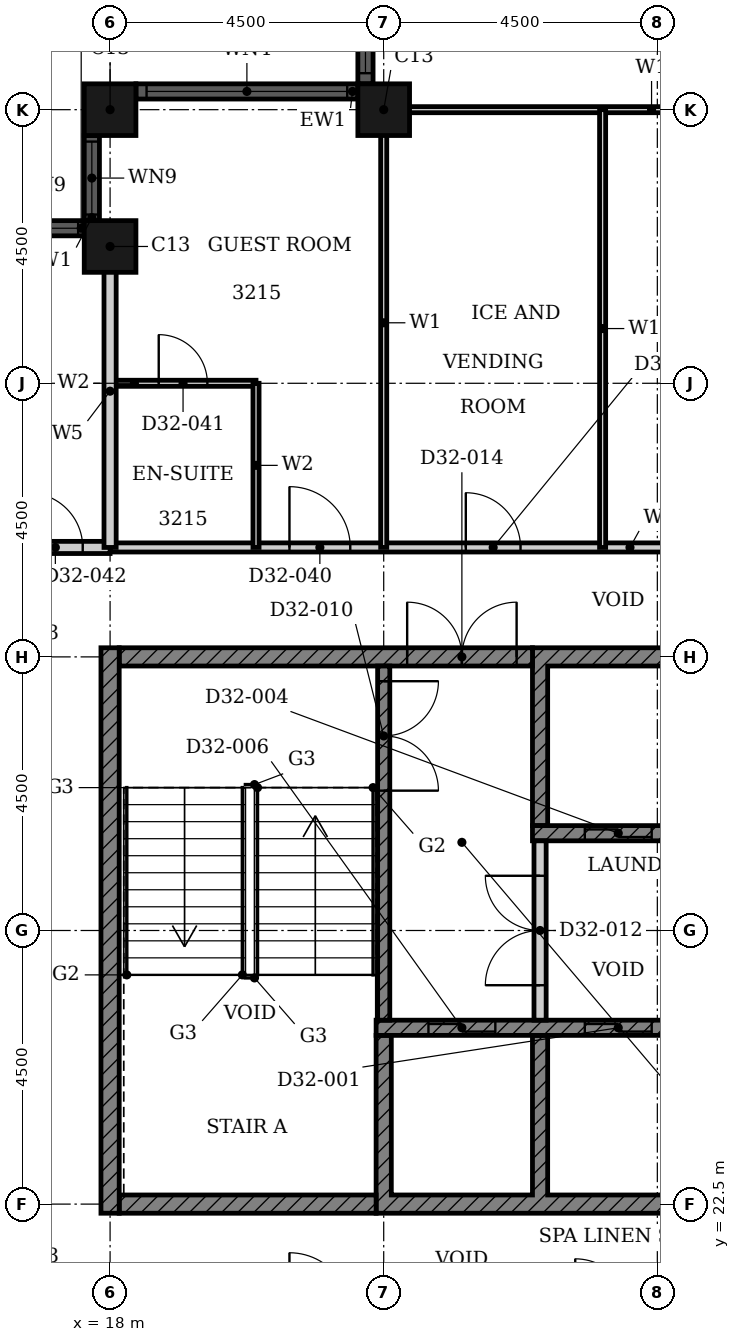
"""IFC4 building model, lengths in metres.
Left out: names, types, materials, properties, quantities, classifications, styles, units other than length and angle.
Written with IfcOpenShell. Run it as: python <this file> out.ifc"""

import sys

from ifc_helpers import new_model, si_unit, direction, frame, frame_2d, origin, origin_2d, place, context, subcontext, project, spatial, polyline, rectangle, hollow_rectangle, outline, extrude, element, fill, save


model = new_model("IFC4")
c1 = context("Model", 3, precision=1e-05, world=origin(), true_north=direction((0.0, 1.0)))
c2 = subcontext(c1, "Body", "Model", "MODEL_VIEW")
j1 = project(units=[si_unit("LENGTHUNIT", "METRE"), si_unit("PLANEANGLEUNIT", "RADIAN")], contexts=[c1])
p1 = place(None, origin())
s1 = spatial("IfcSite", under=j1, at=p1, CompositionType="ELEMENT")
p2 = place(p1, origin())
s2 = spatial("IfcBuilding", under=s1, at=p2, CompositionType="ELEMENT")
p3 = place(p2, frame((0.0, 0.0, 129.6)))
s3 = spatial("IfcBuildingStorey", under=s2, at=p3, CompositionType="ELEMENT", Elevation=129.6)
for number, where, z_axis, x_axis in (
    (1, (22.5, 40.5, 0.0), (0.0, 0.0, 1.0), (1.0, 0.0, 0.0)),
    (2, (18.0, 40.5, 0.0), (0.0, 0.0, 1.0), (1.0, 0.0, 0.0)),
    (3, (18.0, 38.25, 0.0), (0.0, 0.0, 1.0), (1.0, 0.0, 0.0)),
):
    element("IfcColumn", number, at=place(p3, frame(where, z_axis=z_axis, x_axis=x_axis)), inside=s3, PredefinedType="COLUMN", context=c2, shape_type="SweptSolid", body=[
        extrude(hollow_rectangle(XDim=0.85, YDim=0.85, WallThickness=0.026, at=origin_2d()), origin(), (0.0, 0.0, 1.0), 3.6),
    ])
p4 = place(p3, frame((22.2, 49.075, 0.0), z_axis=(0.0, 0.0, 1.0), x_axis=(0.0, -1.0, 0.0)))
e4 = element("IfcWall", 4, at=p4, inside=s3, PredefinedType="SOLIDWALL", context=c2, shape_type="SweptSolid", body=[
    extrude(rectangle(XDim=8.15, YDim=0.25, at=frame_2d((4.075, 0.0))), origin(), (0.0, 0.0, 1.0), 3.6),
])
p5 = place(p4, frame((0.175, 0.0, 0.9)))
e5 = element("IfcOpeningElement", 5, at=p5, cuts=e4, PredefinedType="OPENING", context=c2, shape_type="SweptSolid", body=[
    extrude(rectangle(XDim=3.3, YDim=2.08, at=frame_2d((1.65, 1.04))), frame((0.0, 0.135, 0.0), z_axis=(0.0, -1.0, 0.0), x_axis=(1.0, 0.0, 0.0)), (0.0, 0.0, 1.0), 0.27),
])
p6 = place(p4, frame((4.675, 0.0, 0.9)))
e6 = element("IfcOpeningElement", 6, at=p6, cuts=e4, PredefinedType="OPENING", context=c2, shape_type="SweptSolid", body=[
    extrude(rectangle(XDim=3.3, YDim=2.08, at=frame_2d((1.65, 1.04))), frame((0.0, 0.135, 0.0), z_axis=(0.0, -1.0, 0.0), x_axis=(1.0, 0.0, 0.0)), (0.0, 0.0, 1.0), 0.27),
])
p7 = place(p3, frame((22.075, 40.8, 0.0), z_axis=(0.0, 0.0, 1.0), x_axis=(-1.0, 0.0, 0.0)))
e7 = element("IfcWall", 7, at=p7, inside=s3, PredefinedType="SOLIDWALL", context=c2, shape_type="SweptSolid", body=[
    extrude(rectangle(XDim=3.65, YDim=0.25, at=frame_2d((1.825, 0.0))), origin(), (0.0, 0.0, 1.0), 3.6),
])
p8 = place(p7, frame((0.175, 0.0, 0.9)))
e8 = element("IfcOpeningElement", 8, at=p8, cuts=e7, PredefinedType="OPENING", context=c2, shape_type="SweptSolid", body=[
    extrude(rectangle(XDim=3.3, YDim=2.08, at=frame_2d((1.65, 1.04))), frame((0.0, 0.135, 0.0), z_axis=(0.0, -1.0, 0.0), x_axis=(1.0, 0.0, 0.0)), (0.0, 0.0, 1.0), 0.27),
])
p9 = place(p3, frame((17.7, 40.075, 0.0), z_axis=(0.0, 0.0, 1.0), x_axis=(0.0, -1.0, 0.0)))
e9 = element("IfcWall", 9, at=p9, inside=s3, PredefinedType="SOLIDWALL", context=c2, shape_type="SweptSolid", body=[
    extrude(rectangle(XDim=1.4, YDim=0.25, at=frame_2d((0.7, 0.0))), origin(), (0.0, 0.0, 1.0), 3.6),
])
p10 = place(p9, frame((0.1, 0.0, 0.9)))
e10 = element("IfcOpeningElement", 10, at=p10, cuts=e9, PredefinedType="OPENING", context=c2, shape_type="SweptSolid", body=[
    extrude(rectangle(XDim=1.2, YDim=2.08, at=frame_2d((0.6, 1.04))), frame((0.0, 0.135, 0.0), z_axis=(0.0, -1.0, 0.0), x_axis=(1.0, 0.0, 0.0)), (0.0, 0.0, 1.0), 0.27),
])
p11 = place(p3, frame((17.575, 38.55, 0.0), z_axis=(0.0, 0.0, 1.0), x_axis=(-1.0, 0.0, 0.0)))
e11 = element("IfcWall", 11, at=p11, inside=s3, PredefinedType="SOLIDWALL", context=c2, shape_type="SweptSolid", body=[
    extrude(rectangle(XDim=1.4, YDim=0.25, at=frame_2d((0.7, 0.0))), origin(), (0.0, 0.0, 1.0), 3.6),
])
p12 = place(p11, frame((0.1, 0.0, 0.9)))
e12 = element("IfcOpeningElement", 12, at=p12, cuts=e11, PredefinedType="OPENING", context=c2, shape_type="SweptSolid", body=[
    extrude(rectangle(XDim=1.2, YDim=2.08, at=frame_2d((0.6, 1.04))), frame((0.0, 0.135, 0.0), z_axis=(0.0, -1.0, 0.0), x_axis=(1.0, 0.0, 0.0)), (0.0, 0.0, 1.0), 0.27),
])
p13 = place(p3, origin())
e13 = element("IfcWall", 13, at=p13, inside=s3, PredefinedType="SHEAR", context=c2, shape_type="SweptSolid", body=[
    extrude(outline(polyline([(22.375, 22.35), (38.053, 22.35), (38.053, 25.275), (37.803, 25.275), (37.803, 22.65), (35.482, 22.65), (35.482, 25.275), (35.232, 25.275), (35.232, 22.65), (32.911, 22.65), (32.911, 25.275), (32.661, 25.275), (32.661, 22.65), (30.339, 22.65), (30.339, 25.275), (30.089, 25.275), (30.089, 22.65), (27.768, 22.65), (27.768, 25.275), (27.518, 25.275), (27.518, 22.65), (25.197, 22.65), (25.197, 25.275), (24.947, 25.275), (24.947, 22.65), (22.625, 22.65), (22.625, 25.275), (22.375, 25.275), (22.375, 22.35)])), origin(), (0.0, 0.0, 1.0), 3.3),
])
p14 = place(p3, origin())
e14 = element("IfcWall", 14, at=p14, inside=s3, PredefinedType="SHEAR", context=c2, shape_type="SweptSolid", body=[
    extrude(outline(polyline([(24.947, 28.725), (25.197, 28.725), (25.197, 31.35), (27.518, 31.35), (27.518, 28.725), (27.768, 28.725), (27.768, 31.35), (30.089, 31.35), (30.089, 28.725), (30.339, 28.725), (30.339, 31.35), (32.661, 31.35), (32.661, 28.725), (32.911, 28.725), (32.911, 31.35), (35.232, 31.35), (35.232, 28.725), (35.482, 28.725), (35.482, 31.35), (37.803, 31.35), (37.803, 28.725), (38.053, 28.725), (38.053, 31.35), (40.375, 31.35), (40.375, 28.725), (40.625, 28.725), (40.625, 31.65), (24.947, 31.65), (24.947, 28.725)])), origin(), (0.0, 0.0, 1.0), 3.3),
])
p15 = place(p3, frame((18.15, 22.5, 0.0), z_axis=(0.0, 0.0, 1.0), x_axis=(1.0, 0.0, 0.0)))
e15 = element("IfcWall", 15, at=p15, inside=s3, PredefinedType="SHEAR", context=c2, shape_type="SweptSolid", body=[
    extrude(rectangle(XDim=4.225, YDim=0.3, at=frame_2d((2.113, 0.0))), origin(), (0.0, 0.0, 1.0), 3.3),
])
p16 = place(p3, frame((18.15, 31.5, 0.0), z_axis=(0.0, 0.0, 1.0), x_axis=(1.0, 0.0, 0.0)))
e16 = element("IfcWall", 16, at=p16, inside=s3, PredefinedType="SHEAR", context=c2, shape_type="SweptSolid", body=[
    extrude(rectangle(XDim=6.797, YDim=0.3, at=frame_2d((3.398, 0.0))), origin(), (0.0, 0.0, 1.0), 3.3),
])
p17 = place(p16, frame((4.736, 0.0, 0.0)))
e17 = element("IfcOpeningElement", 17, at=p17, cuts=e16, PredefinedType="OPENING", context=c2, shape_type="SweptSolid", body=[
    extrude(rectangle(XDim=1.8, YDim=2.1, at=frame_2d((0.9, 1.05))), frame((0.0, 0.16, 0.0), z_axis=(0.0, -1.0, 0.0), x_axis=(1.0, 0.0, 0.0)), (0.0, 0.0, 1.0), 0.32),
])
p18 = place(p3, frame((18.0, 22.35, 0.0), z_axis=(0.0, 0.0, 1.0), x_axis=(0.0, 1.0, 0.0)))
e18 = element("IfcWall", 18, at=p18, inside=s3, PredefinedType="SHEAR", context=c2, shape_type="SweptSolid", body=[
    extrude(rectangle(XDim=9.3, YDim=0.3, at=frame_2d((4.65, 0.0))), origin(), (0.0, 0.0, 1.0), 3.3),
])
p19 = place(p3, frame((22.375, 25.4, 0.0), z_axis=(0.0, 0.0, 1.0), x_axis=(1.0, 0.0, 0.0)))
e19 = element("IfcWall", 19, at=p19, inside=s3, PredefinedType="SHEAR", context=c2, shape_type="SweptSolid", body=[
    extrude(rectangle(XDim=15.678, YDim=0.25, at=frame_2d((7.839, 0.0))), origin(), (0.0, 0.0, 1.0), 3.3),
])
p20 = place(p19, frame((3.432, 0.0, 0.0)))
e20 = element("IfcOpeningElement", 20, at=p20, cuts=e19, PredefinedType="OPENING", context=c2, shape_type="SweptSolid", body=[
    extrude(rectangle(XDim=1.1, YDim=2.1, at=frame_2d((0.55, 1.05))), frame((0.0, 0.135, 0.0), z_axis=(0.0, -1.0, 0.0), x_axis=(1.0, 0.0, 0.0)), (0.0, 0.0, 1.0), 0.27),
])
p21 = place(p19, frame((11.146, 0.0, 0.0)))
e21 = element("IfcOpeningElement", 21, at=p21, cuts=e19, PredefinedType="OPENING", context=c2, shape_type="SweptSolid", body=[
    extrude(rectangle(XDim=1.1, YDim=2.1, at=frame_2d((0.55, 1.05))), frame((0.0, 0.135, 0.0), z_axis=(0.0, -1.0, 0.0), x_axis=(1.0, 0.0, 0.0)), (0.0, 0.0, 1.0), 0.27),
])
p22 = place(p19, frame((13.718, 0.0, 0.0)))
e22 = element("IfcOpeningElement", 22, at=p22, cuts=e19, PredefinedType="OPENING", context=c2, shape_type="SweptSolid", body=[
    extrude(rectangle(XDim=1.1, YDim=2.1, at=frame_2d((0.55, 1.05))), frame((0.0, 0.135, 0.0), z_axis=(0.0, -1.0, 0.0), x_axis=(1.0, 0.0, 0.0)), (0.0, 0.0, 1.0), 0.27),
])
p23 = place(p19, frame((0.861, 0.0, 0.0)))
e23 = element("IfcOpeningElement", 23, at=p23, cuts=e19, PredefinedType="OPENING", context=c2, shape_type="SweptSolid", body=[
    extrude(rectangle(XDim=1.1, YDim=2.1, at=frame_2d((0.55, 1.05))), frame((0.0, 0.135, 0.0), z_axis=(0.0, -1.0, 0.0), x_axis=(1.0, 0.0, 0.0)), (0.0, 0.0, 1.0), 0.27),
])
p24 = place(p3, frame((24.947, 28.6, 0.0), z_axis=(0.0, 0.0, 1.0), x_axis=(1.0, 0.0, 0.0)))
e24 = element("IfcWall", 24, at=p24, inside=s3, PredefinedType="SHEAR", context=c2, shape_type="SweptSolid", body=[
    extrude(rectangle(XDim=15.678, YDim=0.25, at=frame_2d((7.839, 0.0))), origin(), (0.0, 0.0, 1.0), 3.3),
])
p25 = place(p24, frame((0.861, 0.0, 0.0)))
e25 = element("IfcOpeningElement", 25, at=p25, cuts=e24, PredefinedType="OPENING", context=c2, shape_type="SweptSolid", body=[
    extrude(rectangle(XDim=1.1, YDim=2.1, at=frame_2d((0.55, 1.05))), frame((0.0, 0.135, 0.0), z_axis=(0.0, -1.0, 0.0), x_axis=(1.0, 0.0, 0.0)), (0.0, 0.0, 1.0), 0.27),
])
p26 = place(p24, frame((8.575, 0.0, 0.0)))
e26 = element("IfcOpeningElement", 26, at=p26, cuts=e24, PredefinedType="OPENING", context=c2, shape_type="SweptSolid", body=[
    extrude(rectangle(XDim=1.1, YDim=2.1, at=frame_2d((0.55, 1.05))), frame((0.0, 0.135, 0.0), z_axis=(0.0, -1.0, 0.0), x_axis=(1.0, 0.0, 0.0)), (0.0, 0.0, 1.0), 0.27),
])
p27 = place(p24, frame((13.718, 0.0, 0.0)))
e27 = element("IfcOpeningElement", 27, at=p27, cuts=e24, PredefinedType="OPENING", context=c2, shape_type="SweptSolid", body=[
    extrude(rectangle(XDim=1.1, YDim=2.1, at=frame_2d((0.55, 1.05))), frame((0.0, 0.135, 0.0), z_axis=(0.0, -1.0, 0.0), x_axis=(1.0, 0.0, 0.0)), (0.0, 0.0, 1.0), 0.27),
])
p28 = place(p3, frame((22.5, 31.35, 0.0), z_axis=(0.0, 0.0, 1.0), x_axis=(0.0, -1.0, 0.0)))
e28 = element("IfcWall", 28, at=p28, inside=s3, PredefinedType="SHEAR", context=c2, shape_type="SweptSolid", body=[
    extrude(rectangle(XDim=5.825, YDim=0.2, at=frame_2d((2.913, 0.0))), origin(), (0.0, 0.0, 1.0), 3.3),
])
p29 = place(p28, frame((0.25, 0.0, 0.0)))
e29 = element("IfcOpeningElement", 29, at=p29, cuts=e28, PredefinedType="OPENING", context=c2, shape_type="SweptSolid", body=[
    extrude(rectangle(XDim=1.8, YDim=2.1, at=frame_2d((0.9, 1.05))), frame((0.0, 0.11, 0.0), z_axis=(0.0, -1.0, 0.0), x_axis=(1.0, 0.0, 0.0)), (0.0, 0.0, 1.0), 0.22),
])
p30 = place(p3, frame((25.072, 25.525, 0.0), z_axis=(0.0, 0.0, 1.0), x_axis=(0.0, 1.0, 0.0)))
e30 = element("IfcWall", 30, at=p30, inside=s3, PredefinedType="PARTITIONING", context=c2, shape_type="SweptSolid", body=[
    extrude(rectangle(XDim=2.95, YDim=0.2, at=frame_2d((1.475, 0.0))), origin(), (0.0, 0.0, 1.0), 3.3),
])
p31 = place(p30, frame((0.575, 0.0, 0.0)))
e31 = element("IfcOpeningElement", 31, at=p31, cuts=e30, PredefinedType="OPENING", context=c2, shape_type="SweptSolid", body=[
    extrude(rectangle(XDim=1.8, YDim=2.1, at=frame_2d((0.9, 1.05))), frame((0.0, 0.11, 0.0), z_axis=(0.0, -1.0, 0.0), x_axis=(1.0, 0.0, 0.0)), (0.0, 0.0, 1.0), 0.22),
])
p32 = place(p3, frame((18.0, 33.3, 0.0), z_axis=(0.0, 0.0, 1.0), x_axis=(1.0, 0.0, 0.0)))
e32 = element("IfcWall", 32, at=p32, inside=s3, PredefinedType="PARTITIONING", context=c2, shape_type="SweptSolid", body=[
    extrude(rectangle(XDim=13.5, YDim=0.15, at=frame_2d((6.75, 0.0))), origin(), (0.0, 0.0, 1.0), 3.3),
])
p33 = place(p32, frame((2.95, 0.0, 0.0)))
e33 = element("IfcOpeningElement", 33, at=p33, cuts=e32, PredefinedType="OPENING", context=c2, shape_type="SweptSolid", body=[
    extrude(rectangle(XDim=1.0, YDim=2.1, at=frame_2d((0.5, 1.05))), frame((0.0, 0.085, 0.0), z_axis=(0.0, -1.0, 0.0), x_axis=(1.0, 0.0, 0.0)), (0.0, 0.0, 1.0), 0.17),
])
p34 = place(p32, frame((5.85, 0.0, 0.0)))
e34 = element("IfcOpeningElement", 34, at=p34, cuts=e32, PredefinedType="OPENING", context=c2, shape_type="SweptSolid", body=[
    extrude(rectangle(XDim=0.9, YDim=2.1, at=frame_2d((0.45, 1.05))), frame((0.0, 0.085, 0.0), z_axis=(0.0, -1.0, 0.0), x_axis=(1.0, 0.0, 0.0)), (0.0, 0.0, 1.0), 0.17),
])
p35 = place(p32, frame((10.35, 0.0, 0.0)))
e35 = element("IfcOpeningElement", 35, at=p35, cuts=e32, PredefinedType="OPENING", context=c2, shape_type="SweptSolid", body=[
    extrude(rectangle(XDim=0.9, YDim=2.1, at=frame_2d((0.45, 1.05))), frame((0.0, 0.085, 0.0), z_axis=(0.0, -1.0, 0.0), x_axis=(1.0, 0.0, 0.0)), (0.0, 0.0, 1.0), 0.17),
])
p36 = place(p3, frame((22.31, 40.5, 0.0), z_axis=(0.0, 0.0, 1.0), x_axis=(1.0, 0.0, 0.0)))
e36 = element("IfcWall", 36, at=p36, inside=s3, PredefinedType="PARTITIONING", context=c2, shape_type="SweptSolid", body=[
    extrude(rectangle(XDim=9.19, YDim=0.1, at=frame_2d((4.595, 0.0))), origin(), (0.0, 0.0, 1.0), 2.38),
])
p37 = place(p3, frame((22.5, 33.3, 0.0), z_axis=(0.0, 0.0, 1.0), x_axis=(0.0, 1.0, 0.0)))
e37 = element("IfcWall", 37, at=p37, inside=s3, PredefinedType="PARTITIONING", context=c2, shape_type="SweptSolid", body=[
    extrude(rectangle(XDim=7.39, YDim=0.1, at=frame_2d((3.695, 0.0))), origin(), (0.0, 0.0, 1.0), 3.3),
])
p38 = place(p3, frame((26.1, 33.3, 0.0), z_axis=(0.0, 0.0, 1.0), x_axis=(0.0, 1.0, 0.0)))
e38 = element("IfcWall", 38, at=p38, inside=s3, PredefinedType="PARTITIONING", context=c2, shape_type="SweptSolid", body=[
    extrude(rectangle(XDim=7.2, YDim=0.1, at=frame_2d((3.6, 0.0))), origin(), (0.0, 0.0, 1.0), 3.3),
])
p39 = place(p3, frame((18.0, 36.0, 0.0), z_axis=(0.0, 0.0, 1.0), x_axis=(1.0, 0.0, 0.0)))
e39 = element("IfcWall", 39, at=p39, inside=s3, PredefinedType="PARTITIONING", context=c2, shape_type="SweptSolid", body=[
    extrude(rectangle(XDim=2.4, YDim=0.1, at=frame_2d((1.2, 0.0))), origin(), (0.0, 0.0, 1.0), 3.3),
])
p40 = place(p39, frame((0.8, 0.0, 0.0)))
e40 = element("IfcOpeningElement", 40, at=p40, cuts=e39, PredefinedType="OPENING", context=c2, shape_type="SweptSolid", body=[
    extrude(rectangle(XDim=0.8, YDim=2.1, at=frame_2d((0.4, 1.05))), frame((0.0, 0.06, 0.0), z_axis=(0.0, -1.0, 0.0), x_axis=(1.0, 0.0, 0.0)), (0.0, 0.0, 1.0), 0.12),
])
p41 = place(p3, frame((20.4, 33.3, 0.0), z_axis=(0.0, 0.0, 1.0), x_axis=(0.0, 1.0, 0.0)))
e41 = element("IfcWall", 41, at=p41, inside=s3, PredefinedType="PARTITIONING", context=c2, shape_type="SweptSolid", body=[
    extrude(rectangle(XDim=2.7, YDim=0.1, at=frame_2d((1.35, 0.0))), origin(), (0.0, 0.0, 1.0), 3.3),
])
p42 = place(p3, frame((13.5, 33.3, 0.0), z_axis=(0.0, 0.0, 1.0), x_axis=(1.0, 0.0, 0.0)))
e42 = element("IfcWall", 42, at=p42, inside=s3, PredefinedType="PARTITIONING", context=c2, shape_type="SweptSolid", body=[
    extrude(rectangle(XDim=4.5, YDim=0.2, at=frame_2d((2.25, 0.0))), origin(), (0.0, 0.0, 1.0), 3.3),
])
p43 = place(p42, frame((3.15, 0.0, 0.0)))
e43 = element("IfcOpeningElement", 43, at=p43, cuts=e42, PredefinedType="OPENING", context=c2, shape_type="SweptSolid", body=[
    extrude(rectangle(XDim=0.9, YDim=2.1, at=frame_2d((0.45, 1.05))), frame((0.0, 0.11, 0.0), z_axis=(0.0, -1.0, 0.0), x_axis=(1.0, 0.0, 0.0)), (0.0, 0.0, 1.0), 0.22),
])
p44 = place(p3, frame((18.0, 33.3, 0.0), z_axis=(0.0, 0.0, 1.0), x_axis=(0.0, 1.0, 0.0)))
e44 = element("IfcWall", 44, at=p44, inside=s3, PredefinedType="PARTITIONING", context=c2, shape_type="SweptSolid", body=[
    extrude(rectangle(XDim=5.14, YDim=0.2, at=frame_2d((2.57, 0.0))), origin(), (0.0, 0.0, 1.0), 3.3),
])
p45 = place(p6, origin())
e45 = element("IfcWindow", 45, at=p45, inside=s3, PartitioningType="SINGLE_PANEL", PredefinedType="WINDOW", context=c2, shape_type="SweptSolid", body=[
    extrude(rectangle(XDim=3.3, YDim=2.08, at=frame_2d((1.65, 1.04))), frame((0.0, 0.03, 0.0), z_axis=(0.0, -1.0, 0.0), x_axis=(1.0, 0.0, 0.0)), (0.0, 0.0, 1.0), 0.06),
])
fill(e6, e45)
p46 = place(p8, origin())
e46 = element("IfcWindow", 46, at=p46, inside=s3, PartitioningType="SINGLE_PANEL", PredefinedType="WINDOW", context=c2, shape_type="SweptSolid", body=[
    extrude(rectangle(XDim=3.3, YDim=2.08, at=frame_2d((1.65, 1.04))), frame((0.0, 0.03, 0.0), z_axis=(0.0, -1.0, 0.0), x_axis=(1.0, 0.0, 0.0)), (0.0, 0.0, 1.0), 0.06),
])
fill(e8, e46)
p47 = place(p10, origin())
e47 = element("IfcWindow", 47, at=p47, inside=s3, PartitioningType="SINGLE_PANEL", PredefinedType="WINDOW", context=c2, shape_type="SweptSolid", body=[
    extrude(rectangle(XDim=1.2, YDim=2.08, at=frame_2d((0.6, 1.04))), frame((0.0, 0.03, 0.0), z_axis=(0.0, -1.0, 0.0), x_axis=(1.0, 0.0, 0.0)), (0.0, 0.0, 1.0), 0.06),
])
fill(e10, e47)
p48 = place(p12, origin())
e48 = element("IfcWindow", 48, at=p48, inside=s3, PartitioningType="SINGLE_PANEL", PredefinedType="WINDOW", context=c2, shape_type="SweptSolid", body=[
    extrude(rectangle(XDim=1.2, YDim=2.08, at=frame_2d((0.6, 1.04))), frame((0.0, 0.03, 0.0), z_axis=(0.0, -1.0, 0.0), x_axis=(1.0, 0.0, 0.0)), (0.0, 0.0, 1.0), 0.06),
])
fill(e12, e48)
p49 = place(p20, origin())
e49 = element("IfcDoor", 49, at=p49, inside=s3, OperationType="DOUBLE_DOOR_SLIDING", PredefinedType="DOOR", context=c2, shape_type="SweptSolid", body=[
    extrude(rectangle(XDim=1.1, YDim=2.1, at=frame_2d((0.55, 1.05))), frame((0.0, 0.025, 0.0), z_axis=(0.0, -1.0, 0.0), x_axis=(1.0, 0.0, 0.0)), (0.0, 0.0, 1.0), 0.05),
])
fill(e20, e49)
p50 = place(p25, origin())
e50 = element("IfcDoor", 50, at=p50, inside=s3, OperationType="DOUBLE_DOOR_SLIDING", PredefinedType="DOOR", context=c2, shape_type="SweptSolid", body=[
    extrude(rectangle(XDim=1.1, YDim=2.1, at=frame_2d((0.55, 1.05))), frame((0.0, 0.025, 0.0), z_axis=(0.0, -1.0, 0.0), x_axis=(1.0, 0.0, 0.0)), (0.0, 0.0, 1.0), 0.05),
])
fill(e25, e50)
p51 = place(p23, origin())
e51 = element("IfcDoor", 51, at=p51, inside=s3, OperationType="DOUBLE_DOOR_SLIDING", PredefinedType="DOOR", context=c2, shape_type="SweptSolid", body=[
    extrude(rectangle(XDim=1.1, YDim=2.1, at=frame_2d((0.55, 1.05))), frame((0.0, 0.025, 0.0), z_axis=(0.0, -1.0, 0.0), x_axis=(1.0, 0.0, 0.0)), (0.0, 0.0, 1.0), 0.05),
])
fill(e23, e51)
p52 = place(p29, origin())
e52 = element("IfcDoor", 52, at=p52, inside=s3, OperationType="DOUBLE_DOOR_SINGLE_SWING", PredefinedType="DOOR", context=c2, shape_type="SweptSolid", body=[
    extrude(rectangle(XDim=1.8, YDim=2.1, at=frame_2d((0.9, 1.05))), frame((0.0, 0.025, 0.0), z_axis=(0.0, -1.0, 0.0), x_axis=(1.0, 0.0, 0.0)), (0.0, 0.0, 1.0), 0.05),
])
fill(e29, e52)
p53 = place(p31, origin())
e53 = element("IfcDoor", 53, at=p53, inside=s3, OperationType="DOUBLE_DOOR_SINGLE_SWING", PredefinedType="DOOR", context=c2, shape_type="SweptSolid", body=[
    extrude(rectangle(XDim=1.8, YDim=2.1, at=frame_2d((0.9, 1.05))), frame((0.0, 0.025, 0.0), z_axis=(0.0, -1.0, 0.0), x_axis=(1.0, 0.0, 0.0)), (0.0, 0.0, 1.0), 0.05),
])
fill(e31, e53)
p54 = place(p17, origin())
e54 = element("IfcDoor", 54, at=p54, inside=s3, OperationType="DOUBLE_DOOR_SINGLE_SWING", PredefinedType="DOOR", context=c2, shape_type="SweptSolid", body=[
    extrude(rectangle(XDim=1.8, YDim=2.1, at=frame_2d((0.9, 1.05))), frame((0.0, 0.025, 0.0), z_axis=(0.0, -1.0, 0.0), x_axis=(1.0, 0.0, 0.0)), (0.0, 0.0, 1.0), 0.05),
])
fill(e17, e54)
p55 = place(p33, origin())
e55 = element("IfcDoor", 55, at=p55, inside=s3, OperationType="SINGLE_SWING_RIGHT", PredefinedType="DOOR", context=c2, shape_type="SweptSolid", body=[
    extrude(rectangle(XDim=1.0, YDim=2.1, at=frame_2d((0.5, 1.05))), frame((0.0, 0.025, 0.0), z_axis=(0.0, -1.0, 0.0), x_axis=(1.0, 0.0, 0.0)), (0.0, 0.0, 1.0), 0.05),
])
fill(e33, e55)
p56 = place(p40, origin())
e56 = element("IfcDoor", 56, at=p56, inside=s3, OperationType="SINGLE_SWING_LEFT", PredefinedType="DOOR", context=c2, shape_type="SweptSolid", body=[
    extrude(rectangle(XDim=0.8, YDim=2.1, at=frame_2d((0.4, 1.05))), frame((0.0, 0.025, 0.0), z_axis=(0.0, -1.0, 0.0), x_axis=(1.0, 0.0, 0.0)), (0.0, 0.0, 1.0), 0.05),
])
fill(e40, e56)
p57 = place(p43, origin())
e57 = element("IfcDoor", 57, at=p57, inside=s3, OperationType="SINGLE_SWING_LEFT", PredefinedType="DOOR", context=c2, shape_type="SweptSolid", body=[
    extrude(rectangle(XDim=0.9, YDim=2.1, at=frame_2d((0.45, 1.05))), frame((0.0, 0.025, 0.0), z_axis=(0.0, -1.0, 0.0), x_axis=(1.0, 0.0, 0.0)), (0.0, 0.0, 1.0), 0.05),
])
fill(e43, e57)
p58 = place(p34, origin())
e58 = element("IfcDoor", 58, at=p58, inside=s3, OperationType="SINGLE_SWING_RIGHT", PredefinedType="DOOR", context=c2, shape_type="SweptSolid", body=[
    extrude(rectangle(XDim=0.9, YDim=2.1, at=frame_2d((0.45, 1.05))), frame((0.0, 0.025, 0.0), z_axis=(0.0, -1.0, 0.0), x_axis=(1.0, 0.0, 0.0)), (0.0, 0.0, 1.0), 0.05),
])
fill(e34, e58)
save(model, sys.argv[1])
